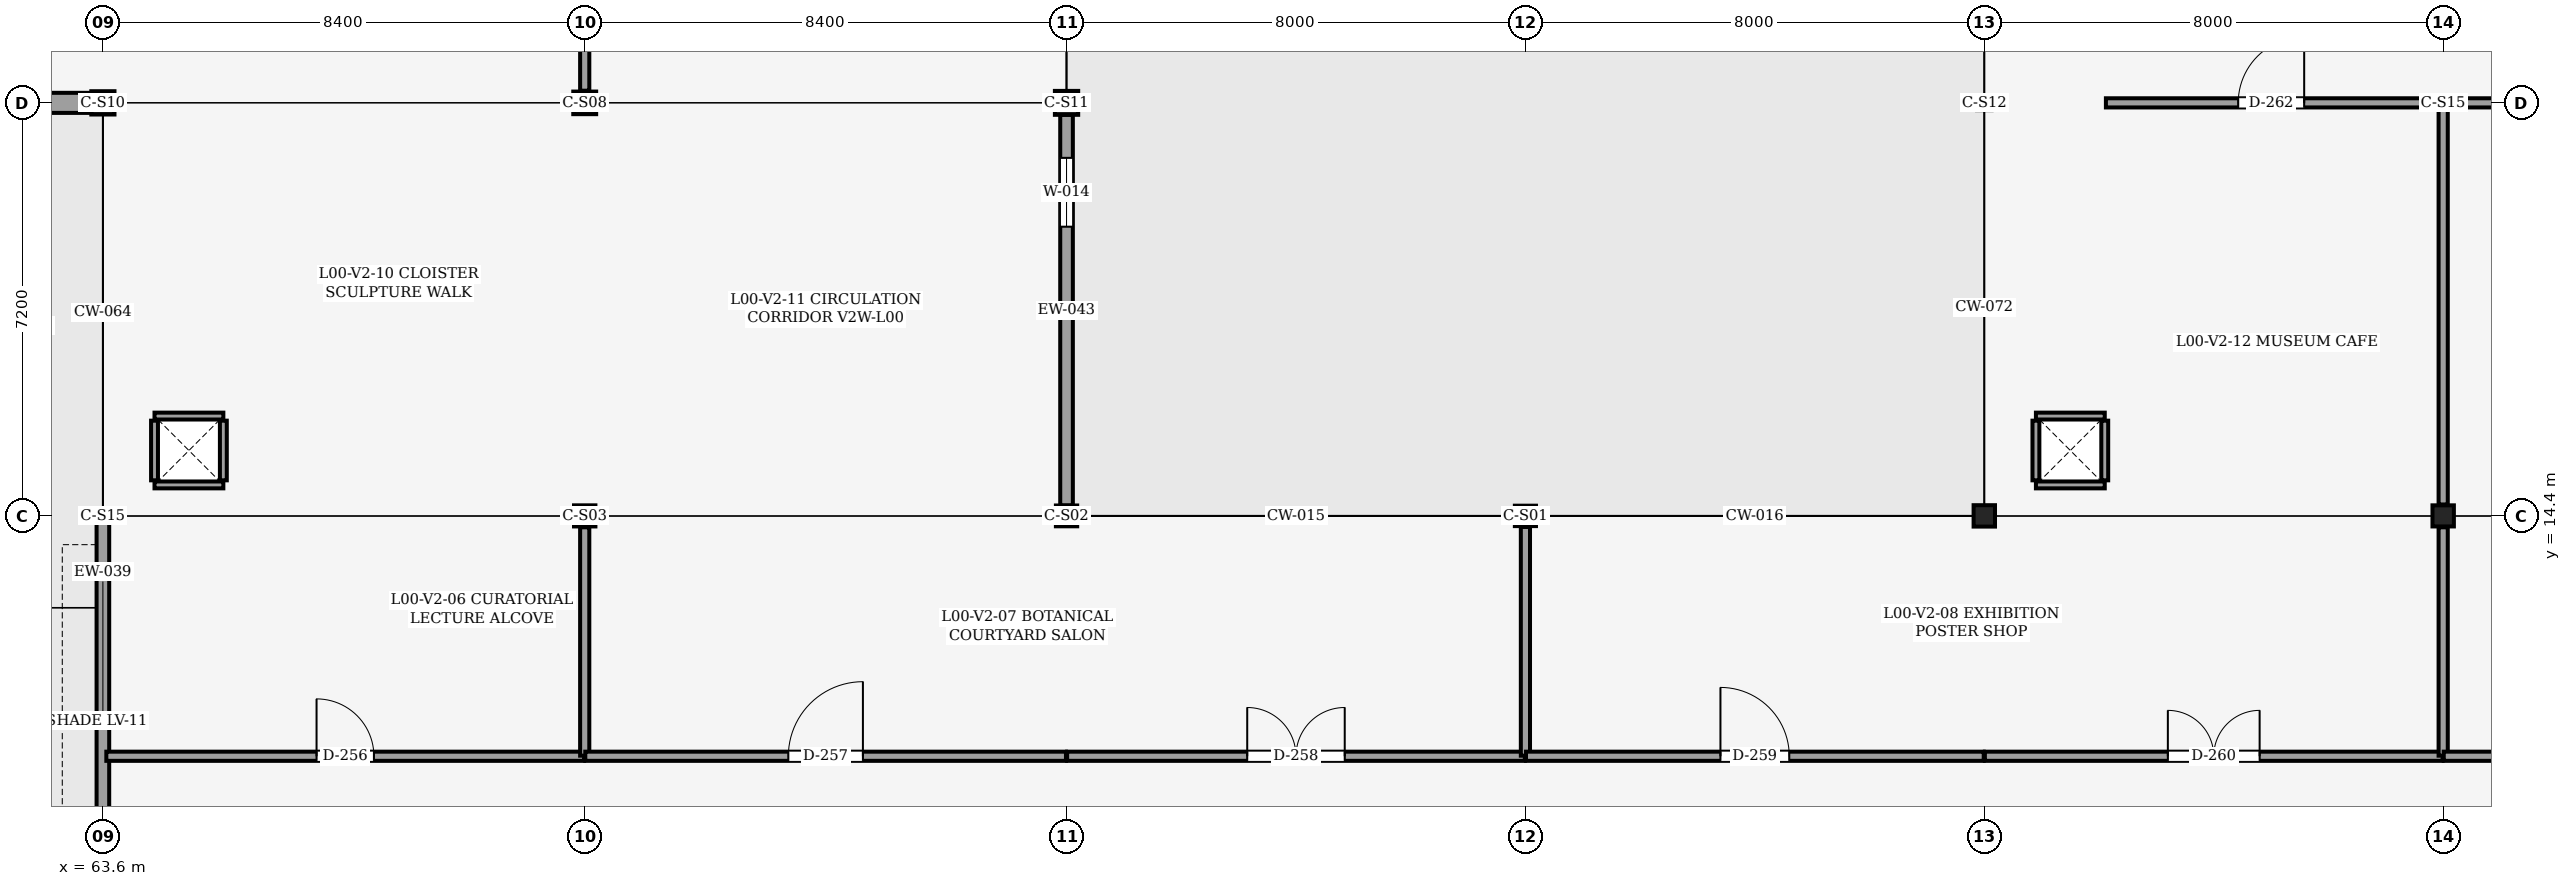
"""IFC4 building model, lengths in metres.
Left out: names, types, materials, properties, quantities, classifications, styles, units other than length and angle.
Written with IfcOpenShell. Run it as: python <this file> out.ifc"""

import sys

from ifc_helpers import new_model, si_unit, direction, frame, frame_2d, origin, origin_2d, place, context, subcontext, project, spatial, rectangle, hollow_rectangle, i_section, extrude, element, fill, save


model = new_model("IFC4")
c1 = context("Model", 3, precision=1e-05, world=origin(), true_north=direction((0.0, 1.0)))
c2 = subcontext(c1, "Body", "Model", "MODEL_VIEW")
j1 = project(units=[si_unit("LENGTHUNIT", "METRE"), si_unit("PLANEANGLEUNIT", "RADIAN")], contexts=[c1])
p1 = place(None, origin())
s1 = spatial("IfcSite", under=j1, at=p1, CompositionType="ELEMENT")
p2 = place(p1, origin())
s2 = spatial("IfcBuilding", under=s1, at=p2, CompositionType="ELEMENT")
p3 = place(p2, origin())
s3 = spatial("IfcBuildingStorey", under=s2, at=p3, CompositionType="ELEMENT", Elevation=0.0)
p4 = place(p3, frame((63.6, 14.4, 0.0), z_axis=(0.0, 0.0, 1.0), x_axis=(1.0, 0.0, 0.0)))
e1 = element("IfcColumn", 1, at=p4, inside=s3, PredefinedType="COLUMN", context=c2, shape_type="SweptSolid", body=[
    extrude(hollow_rectangle(XDim=0.203, YDim=0.203, WallThickness=0.013, OuterFilletRadius=0.025, at=origin_2d()), origin(), (0.0, 0.0, 1.0), 5.4),
])
p5 = place(p3, frame((63.6, 21.6, 0.0), z_axis=(0.0, 0.0, 1.0), x_axis=(1.0, 0.0, 0.0)))
e2 = element("IfcColumn", 2, at=p5, inside=s3, PredefinedType="COLUMN", context=c2, shape_type="SweptSolid", body=[
    extrude(i_section(OverallWidth=0.404, OverallDepth=0.406, WebThickness=0.027, FlangeThickness=0.044, FilletRadius=0.025, at=origin_2d()), origin(), (0.0, 0.0, 1.0), 5.4),
])
p6 = place(p3, frame((72.0, 14.4, 0.0), z_axis=(0.0, 0.0, 1.0), x_axis=(1.0, 0.0, 0.0)))
e3 = element("IfcColumn", 3, at=p6, inside=s3, PredefinedType="COLUMN", context=c2, shape_type="SweptSolid", body=[
    extrude(i_section(OverallWidth=0.373, OverallDepth=0.368, WebThickness=0.015, FlangeThickness=0.024, FilletRadius=0.025, at=origin_2d()), origin(), (0.0, 0.0, 1.0), 5.4),
])
p7 = place(p3, frame((72.0, 21.6, 0.0), z_axis=(0.0, 0.0, 1.0), x_axis=(1.0, 0.0, 0.0)))
e4 = element("IfcColumn", 4, at=p7, inside=s3, PredefinedType="COLUMN", context=c2, shape_type="SweptSolid", body=[
    extrude(i_section(OverallWidth=0.399, OverallDepth=0.394, WebThickness=0.023, FlangeThickness=0.037, FilletRadius=0.025, at=origin_2d()), origin(), (0.0, 0.0, 1.0), 5.4),
])
p8 = place(p3, frame((80.4, 14.4, 0.0), z_axis=(0.0, 0.0, 1.0), x_axis=(1.0, 0.0, 0.0)))
e5 = element("IfcColumn", 5, at=p8, inside=s3, PredefinedType="COLUMN", context=c2, shape_type="SweptSolid", body=[
    extrude(i_section(OverallWidth=0.371, OverallDepth=0.363, WebThickness=0.013, FlangeThickness=0.022, FilletRadius=0.025, at=origin_2d()), origin(), (0.0, 0.0, 1.0), 5.4),
])
p9 = place(p3, frame((80.4, 21.6, 0.0), z_axis=(0.0, 0.0, 1.0), x_axis=(1.0, 0.0, 0.0)))
e6 = element("IfcColumn", 6, at=p9, inside=s3, PredefinedType="COLUMN", context=c2, shape_type="SweptSolid", body=[
    extrude(i_section(OverallWidth=0.406, OverallDepth=0.417, WebThickness=0.03, FlangeThickness=0.048, FilletRadius=0.025, at=origin_2d()), origin(), (0.0, 0.0, 1.0), 5.4),
])
p10 = place(p3, frame((88.4, 14.4, 0.0), z_axis=(0.0, 0.0, 1.0), x_axis=(1.0, 0.0, 0.0)))
e7 = element("IfcColumn", 7, at=p10, inside=s3, PredefinedType="COLUMN", context=c2, shape_type="SweptSolid", body=[
    extrude(i_section(OverallWidth=0.368, OverallDepth=0.356, WebThickness=0.011, FlangeThickness=0.018, FilletRadius=0.025, at=origin_2d()), origin(), (0.0, 0.0, 1.0), 5.4),
])
p11 = place(p3, frame((96.4, 14.4, 0.0), z_axis=(0.0, 0.0, 1.0), x_axis=(1.0, 0.0, 0.0)))
e8 = element("IfcColumn", 8, at=p11, inside=s3, PredefinedType="COLUMN", context=c2, shape_type="SweptSolid", body=[
    extrude(i_section(OverallWidth=0.373, OverallDepth=0.373, WebThickness=0.016, FlangeThickness=0.026, FilletRadius=0.025, at=origin_2d()), origin(), (0.0, 0.0, 1.0), 5.4),
])
p12 = place(p3, frame((96.4, 21.6, 0.0), z_axis=(0.0, 0.0, 1.0), x_axis=(1.0, 0.0, 0.0)))
e9 = element("IfcColumn", 9, at=p12, inside=s3, PredefinedType="COLUMN", context=c2, shape_type="SweptSolid", body=[
    extrude(hollow_rectangle(XDim=0.254, YDim=0.254, WallThickness=0.013, OuterFilletRadius=0.025, at=origin_2d()), origin(), (0.0, 0.0, 1.0), 5.4),
])
p13 = place(p3, frame((104.4, 14.4, 0.0), z_axis=(0.0, 0.0, 1.0), x_axis=(1.0, 0.0, 0.0)))
e10 = element("IfcColumn", 10, at=p13, inside=s3, PredefinedType="COLUMN", context=c2, shape_type="SweptSolid", body=[
    extrude(i_section(OverallWidth=0.373, OverallDepth=0.368, WebThickness=0.015, FlangeThickness=0.024, FilletRadius=0.025, at=origin_2d()), origin(), (0.0, 0.0, 1.0), 5.4),
])
p14 = place(p3, frame((104.4, 21.6, 0.0), z_axis=(0.0, 0.0, 1.0), x_axis=(1.0, 0.0, 0.0)))
e11 = element("IfcColumn", 11, at=p14, inside=s3, PredefinedType="COLUMN", context=c2, shape_type="SweptSolid", body=[
    extrude(hollow_rectangle(XDim=0.203, YDim=0.203, WallThickness=0.013, OuterFilletRadius=0.025, at=origin_2d()), origin(), (0.0, 0.0, 1.0), 5.4),
])
p15 = place(p3, frame((63.398, 21.6, 0.0), z_axis=(0.0, 0.0, 1.0), x_axis=(-1.0, 0.0, 0.0)))
e12 = element("IfcWall", 12, at=p15, inside=s3, PredefinedType="SOLIDWALL", context=c2, shape_type="SweptSolid", body=[
    extrude(rectangle(XDim=7.999, YDim=0.35, at=frame_2d((3.999, 0.0))), origin(), (0.0, 0.0, 1.0), 4.883),
])
p16 = place(p15, frame((3.199, 0.0, 0.0)))
e13 = element("IfcOpeningElement", 13, at=p16, cuts=e12, PredefinedType="OPENING", context=c2, shape_type="SweptSolid", body=[
    extrude(rectangle(XDim=1.6, YDim=2.25, at=frame_2d((0.8, 1.125))), frame((0.0, 0.185, 0.0), z_axis=(0.0, -1.0, 0.0), x_axis=(1.0, 0.0, 0.0)), (0.0, 0.0, 1.0), 0.371),
])
p17 = place(p3, frame((63.6, 7.352, 0.0), z_axis=(0.0, 0.0, 1.0), x_axis=(0.0, 1.0, 0.0)))
e14 = element("IfcWall", 14, at=p17, inside=s3, PredefinedType="SOLIDWALL", context=c2, shape_type="SweptSolid", body=[
    extrude(rectangle(XDim=6.946, YDim=0.22, at=frame_2d((3.473, 0.0))), origin(), (0.0, 0.0, 1.0), 4.678),
])
p18 = place(p17, frame((0.75, 0.0, 0.9)))
e15 = element("IfcOpeningElement", 15, at=p18, cuts=e14, PredefinedType="OPENING", context=c2, shape_type="SweptSolid", body=[
    extrude(rectangle(XDim=1.2, YDim=1.5, at=frame_2d((0.6, 0.75))), frame((0.0, 0.12, 0.0), z_axis=(0.0, -1.0, 0.0), x_axis=(1.0, 0.0, 0.0)), (0.0, 0.0, 1.0), 0.24),
])
p19 = place(p3, frame((80.4, 21.392, 0.0), z_axis=(0.0, 0.0, 1.0), x_axis=(0.0, -1.0, 0.0)))
e16 = element("IfcWall", 16, at=p19, inside=s3, PredefinedType="SOLIDWALL", context=c2, shape_type="SweptSolid", body=[
    extrude(rectangle(XDim=6.81, YDim=0.22, at=frame_2d((3.405, 0.0))), origin(), (0.0, 0.0, 1.0), 4.607),
])
p20 = place(p19, frame((0.75, 0.0, 0.9)))
e17 = element("IfcOpeningElement", 17, at=p20, cuts=e16, PredefinedType="OPENING", context=c2, shape_type="SweptSolid", body=[
    extrude(rectangle(XDim=1.2, YDim=1.5, at=frame_2d((0.6, 0.75))), frame((0.0, 0.12, 0.0), z_axis=(0.0, -1.0, 0.0), x_axis=(1.0, 0.0, 0.0)), (0.0, 0.0, 1.0), 0.24),
])
for number, where, z_axis, x_axis in (
    (18, (64.5, 14.94, 0.0), (0.0, 0.0, 1.0), (1.0, 0.0, 0.0)),
    (19, (64.5, 16.14, 0.0), (0.0, 0.0, 1.0), (1.0, 0.0, 0.0)),
):
    element("IfcWall", number, at=place(p3, frame(where, z_axis=z_axis, x_axis=x_axis)), inside=s3, PredefinedType="PARTITIONING", context=c2, shape_type="SweptSolid", body=[
        extrude(rectangle(XDim=1.2, YDim=0.12, at=frame_2d((0.6, 0.0))), origin(), (0.0, 0.0, 1.0), 5.16),
    ])
for number, where, z_axis, x_axis in (
    (20, (64.5, 15.02, 0.0), (0.0, 0.0, 1.0), (0.0, 1.0, 0.0)),
    (21, (65.7, 15.02, 0.0), (0.0, 0.0, 1.0), (0.0, 1.0, 0.0)),
):
    element("IfcWall", number, at=place(p3, frame(where, z_axis=z_axis, x_axis=x_axis)), inside=s3, PredefinedType="PARTITIONING", context=c2, shape_type="SweptSolid", body=[
        extrude(rectangle(XDim=1.04, YDim=0.12, at=frame_2d((0.52, 0.0))), origin(), (0.0, 0.0, 1.0), 5.16),
    ])
for number, where, z_axis, x_axis in (
    (22, (97.3, 14.94, 0.0), (0.0, 0.0, 1.0), (1.0, 0.0, 0.0)),
    (23, (97.3, 16.14, 0.0), (0.0, 0.0, 1.0), (1.0, 0.0, 0.0)),
):
    element("IfcWall", number, at=place(p3, frame(where, z_axis=z_axis, x_axis=x_axis)), inside=s3, PredefinedType="PARTITIONING", context=c2, shape_type="SweptSolid", body=[
        extrude(rectangle(XDim=1.2, YDim=0.12, at=frame_2d((0.6, 0.0))), origin(), (0.0, 0.0, 1.0), 5.16),
    ])
for number, where, z_axis, x_axis in (
    (24, (97.3, 15.02, 0.0), (0.0, 0.0, 1.0), (0.0, 1.0, 0.0)),
    (25, (98.5, 15.02, 0.0), (0.0, 0.0, 1.0), (0.0, 1.0, 0.0)),
):
    element("IfcWall", number, at=place(p3, frame(where, z_axis=z_axis, x_axis=x_axis)), inside=s3, PredefinedType="PARTITIONING", context=c2, shape_type="SweptSolid", body=[
        extrude(rectangle(XDim=1.04, YDim=0.12, at=frame_2d((0.52, 0.0))), origin(), (0.0, 0.0, 1.0), 5.16),
    ])
p21 = place(p3, frame((72.0, 21.812, 0.0), z_axis=(0.0, 0.0, 1.0), x_axis=(0.0, 1.0, 0.0)))
e26 = element("IfcWall", 26, at=p21, inside=s3, PredefinedType="PARTITIONING", context=c2, shape_type="SweptSolid", body=[
    extrude(rectangle(XDim=7.987, YDim=0.16, at=frame_2d((3.993, 0.0))), origin(), (0.0, 0.0, 1.0), 4.213),
])
p22 = place(p3, frame((63.66, 10.21, 0.0), z_axis=(0.0, 0.0, 1.0), x_axis=(1.0, 0.0, 0.0)))
e27 = element("IfcWall", 27, at=p22, inside=s3, PredefinedType="PARTITIONING", context=c2, shape_type="SweptSolid", body=[
    extrude(rectangle(XDim=8.33, YDim=0.16, at=frame_2d((4.165, 0.0))), origin(), (0.0, 0.0, 1.0), 5.14),
])
p23 = place(p22, frame((3.665, 0.0, 0.0)))
e28 = element("IfcOpeningElement", 28, at=p23, cuts=e27, PredefinedType="OPENING", context=c2, shape_type="SweptSolid", body=[
    extrude(rectangle(XDim=1.0, YDim=2.15, at=frame_2d((0.5, 1.075))), frame((0.0, 0.09, 0.0), z_axis=(0.0, -1.0, 0.0), x_axis=(1.0, 0.0, 0.0)), (0.0, 0.0, 1.0), 0.18),
])
p24 = place(p3, frame((72.0, 10.22, 0.0), z_axis=(0.0, 0.0, 1.0), x_axis=(0.0, 1.0, 0.0)))
e29 = element("IfcWall", 29, at=p24, inside=s3, PredefinedType="PARTITIONING", context=c2, shape_type="SweptSolid", body=[
    extrude(rectangle(XDim=3.981, YDim=0.16, at=frame_2d((1.99, 0.0))), origin(), (0.0, 0.0, 1.0), 4.528),
])
p25 = place(p3, frame((72.01, 10.21, 0.0), z_axis=(0.0, 0.0, 1.0), x_axis=(1.0, 0.0, 0.0)))
e30 = element("IfcWall", 30, at=p25, inside=s3, PredefinedType="PARTITIONING", context=c2, shape_type="SweptSolid", body=[
    extrude(rectangle(XDim=8.38, YDim=0.16, at=frame_2d((4.19, 0.0))), origin(), (0.0, 0.0, 1.0), 5.14),
])
p26 = place(p25, frame((3.54, 0.0, 0.0)))
e31 = element("IfcOpeningElement", 31, at=p26, cuts=e30, PredefinedType="OPENING", context=c2, shape_type="SweptSolid", body=[
    extrude(rectangle(XDim=1.3, YDim=2.2, at=frame_2d((0.65, 1.1))), frame((0.0, 0.09, 0.0), z_axis=(0.0, -1.0, 0.0), x_axis=(1.0, 0.0, 0.0)), (0.0, 0.0, 1.0), 0.18),
])
p27 = place(p3, frame((80.41, 10.21, 0.0), z_axis=(0.0, 0.0, 1.0), x_axis=(1.0, 0.0, 0.0)))
e32 = element("IfcWall", 32, at=p27, inside=s3, PredefinedType="PARTITIONING", context=c2, shape_type="SweptSolid", body=[
    extrude(rectangle(XDim=7.98, YDim=0.16, at=frame_2d((3.99, 0.0))), origin(), (0.0, 0.0, 1.0), 5.14),
])
p28 = place(p27, frame((3.14, 0.0, 0.0)))
e33 = element("IfcOpeningElement", 33, at=p28, cuts=e32, PredefinedType="OPENING", context=c2, shape_type="SweptSolid", body=[
    extrude(rectangle(XDim=1.7, YDim=2.4, at=frame_2d((0.85, 1.2))), frame((0.0, 0.09, 0.0), z_axis=(0.0, -1.0, 0.0), x_axis=(1.0, 0.0, 0.0)), (0.0, 0.0, 1.0), 0.18),
])
p29 = place(p3, frame((88.4, 10.22, 0.0), z_axis=(0.0, 0.0, 1.0), x_axis=(0.0, 1.0, 0.0)))
e34 = element("IfcWall", 34, at=p29, inside=s3, PredefinedType="PARTITIONING", context=c2, shape_type="SweptSolid", body=[
    extrude(rectangle(XDim=3.987, YDim=0.16, at=frame_2d((1.994, 0.0))), origin(), (0.0, 0.0, 1.0), 4.607),
])
p30 = place(p3, frame((88.41, 10.21, 0.0), z_axis=(0.0, 0.0, 1.0), x_axis=(1.0, 0.0, 0.0)))
e35 = element("IfcWall", 35, at=p30, inside=s3, PredefinedType="PARTITIONING", context=c2, shape_type="SweptSolid", body=[
    extrude(rectangle(XDim=7.98, YDim=0.16, at=frame_2d((3.99, 0.0))), origin(), (0.0, 0.0, 1.0), 5.14),
])
p31 = place(p30, frame((3.39, 0.0, 0.0)))
e36 = element("IfcOpeningElement", 36, at=p31, cuts=e35, PredefinedType="OPENING", context=c2, shape_type="SweptSolid", body=[
    extrude(rectangle(XDim=1.2, YDim=2.2, at=frame_2d((0.6, 1.1))), frame((0.0, 0.09, 0.0), z_axis=(0.0, -1.0, 0.0), x_axis=(1.0, 0.0, 0.0)), (0.0, 0.0, 1.0), 0.18),
])
p32 = place(p3, frame((96.41, 10.21, 0.0), z_axis=(0.0, 0.0, 1.0), x_axis=(1.0, 0.0, 0.0)))
e37 = element("IfcWall", 37, at=p32, inside=s3, PredefinedType="PARTITIONING", context=c2, shape_type="SweptSolid", body=[
    extrude(rectangle(XDim=7.98, YDim=0.16, at=frame_2d((3.99, 0.0))), origin(), (0.0, 0.0, 1.0), 5.14),
])
p33 = place(p32, frame((3.19, 0.0, 0.0)))
e38 = element("IfcOpeningElement", 38, at=p33, cuts=e37, PredefinedType="OPENING", context=c2, shape_type="SweptSolid", body=[
    extrude(rectangle(XDim=1.6, YDim=2.35, at=frame_2d((0.8, 1.175))), frame((0.0, 0.09, 0.0), z_axis=(0.0, -1.0, 0.0), x_axis=(1.0, 0.0, 0.0)), (0.0, 0.0, 1.0), 0.18),
])
p34 = place(p3, frame((104.4, 10.22, 0.0), z_axis=(0.0, 0.0, 1.0), x_axis=(0.0, 1.0, 0.0)))
e39 = element("IfcWall", 39, at=p34, inside=s3, PredefinedType="PARTITIONING", context=c2, shape_type="SweptSolid", body=[
    extrude(rectangle(XDim=3.981, YDim=0.16, at=frame_2d((1.99, 0.0))), origin(), (0.0, 0.0, 1.0), 4.528),
])
p35 = place(p3, frame((104.41, 10.21, 0.0), z_axis=(0.0, 0.0, 1.0), x_axis=(1.0, 0.0, 0.0)))
e40 = element("IfcWall", 40, at=p35, inside=s3, PredefinedType="PARTITIONING", context=c2, shape_type="SweptSolid", body=[
    extrude(rectangle(XDim=8.33, YDim=0.16, at=frame_2d((4.165, 0.0))), origin(), (0.0, 0.0, 1.0), 5.14),
])
p36 = place(p35, frame((3.215, 0.0, 0.0)))
e41 = element("IfcOpeningElement", 41, at=p36, cuts=e40, PredefinedType="OPENING", context=c2, shape_type="SweptSolid", body=[
    extrude(rectangle(XDim=1.9, YDim=2.45, at=frame_2d((0.95, 1.225))), frame((0.0, 0.09, 0.0), z_axis=(0.0, -1.0, 0.0), x_axis=(1.0, 0.0, 0.0)), (0.0, 0.0, 1.0), 0.18),
])
p37 = place(p3, frame((98.52, 21.6, 0.0), z_axis=(0.0, 0.0, 1.0), x_axis=(1.0, 0.0, 0.0)))
e42 = element("IfcWall", 42, at=p37, inside=s3, PredefinedType="PARTITIONING", context=c2, shape_type="SweptSolid", body=[
    extrude(rectangle(XDim=5.763, YDim=0.16, at=frame_2d((2.882, 0.0))), origin(), (0.0, 0.0, 1.0), 4.591),
])
p38 = place(p37, frame((2.307, 0.0, 0.0)))
e43 = element("IfcOpeningElement", 43, at=p38, cuts=e42, PredefinedType="OPENING", context=c2, shape_type="SweptSolid", body=[
    extrude(rectangle(XDim=1.15, YDim=2.2, at=frame_2d((0.575, 1.1))), frame((0.0, 0.09, 0.0), z_axis=(0.0, -1.0, 0.0), x_axis=(1.0, 0.0, 0.0)), (0.0, 0.0, 1.0), 0.18),
])
p39 = place(p3, frame((104.4, 14.599, 0.0), z_axis=(0.0, 0.0, 1.0), x_axis=(0.0, 1.0, 0.0)))
e44 = element("IfcWall", 44, at=p39, inside=s3, PredefinedType="PARTITIONING", context=c2, shape_type="SweptSolid", body=[
    extrude(rectangle(XDim=6.884, YDim=0.16, at=frame_2d((3.442, 0.0))), origin(), (0.0, 0.0, 1.0), 4.533),
])
p40 = place(p3, frame((104.517, 21.6, 0.0), z_axis=(0.0, 0.0, 1.0), x_axis=(1.0, 0.0, 0.0)))
e45 = element("IfcWall", 45, at=p40, inside=s3, PredefinedType="PARTITIONING", context=c2, shape_type="SweptSolid", body=[
    extrude(rectangle(XDim=8.069, YDim=0.16, at=frame_2d((4.034, 0.0))), origin(), (0.0, 0.0, 1.0), 4.528),
])
p41 = place(p40, frame((3.234, 0.0, 0.0)))
e46 = element("IfcOpeningElement", 46, at=p41, cuts=e45, PredefinedType="OPENING", context=c2, shape_type="SweptSolid", body=[
    extrude(rectangle(XDim=1.6, YDim=2.35, at=frame_2d((0.8, 1.175))), frame((0.0, 0.09, 0.0), z_axis=(0.0, -1.0, 0.0), x_axis=(1.0, 0.0, 0.0)), (0.0, 0.0, 1.0), 0.18),
])
p42 = place(p20, origin())
e47 = element("IfcWindow", 47, at=p42, inside=s3, PartitioningType="SINGLE_PANEL", PredefinedType="WINDOW", context=c2, shape_type="SweptSolid", body=[
    extrude(rectangle(XDim=1.2, YDim=1.5, at=frame_2d((0.6, 0.75))), frame((0.0, 0.03, 0.0), z_axis=(0.0, -1.0, 0.0), x_axis=(1.0, 0.0, 0.0)), (0.0, 0.0, 1.0), 0.06),
])
fill(e17, e47)
p43 = place(p23, origin())
e48 = element("IfcDoor", 48, at=p43, inside=s3, OperationType="SINGLE_SWING_LEFT", PredefinedType="DOOR", context=c2, shape_type="SweptSolid", body=[
    extrude(rectangle(XDim=1.0, YDim=2.15, at=frame_2d((0.5, 1.075))), frame((0.0, 0.025, 0.0), z_axis=(0.0, -1.0, 0.0), x_axis=(1.0, 0.0, 0.0)), (0.0, 0.0, 1.0), 0.05),
])
fill(e28, e48)
p44 = place(p26, origin())
e49 = element("IfcDoor", 49, at=p44, inside=s3, OperationType="SINGLE_SWING_RIGHT", PredefinedType="DOOR", context=c2, shape_type="SweptSolid", body=[
    extrude(rectangle(XDim=1.3, YDim=2.2, at=frame_2d((0.65, 1.1))), frame((0.0, 0.025, 0.0), z_axis=(0.0, -1.0, 0.0), x_axis=(1.0, 0.0, 0.0)), (0.0, 0.0, 1.0), 0.05),
])
fill(e31, e49)
p45 = place(p28, origin())
e50 = element("IfcDoor", 50, at=p45, inside=s3, OperationType="DOUBLE_DOOR_SINGLE_SWING", PredefinedType="DOOR", context=c2, shape_type="SweptSolid", body=[
    extrude(rectangle(XDim=1.7, YDim=2.4, at=frame_2d((0.85, 1.2))), frame((0.0, 0.025, 0.0), z_axis=(0.0, -1.0, 0.0), x_axis=(1.0, 0.0, 0.0)), (0.0, 0.0, 1.0), 0.05),
])
fill(e33, e50)
p46 = place(p31, origin())
e51 = element("IfcDoor", 51, at=p46, inside=s3, OperationType="SINGLE_SWING_LEFT", PredefinedType="DOOR", context=c2, shape_type="SweptSolid", body=[
    extrude(rectangle(XDim=1.2, YDim=2.2, at=frame_2d((0.6, 1.1))), frame((0.0, 0.025, 0.0), z_axis=(0.0, -1.0, 0.0), x_axis=(1.0, 0.0, 0.0)), (0.0, 0.0, 1.0), 0.05),
])
fill(e36, e51)
p47 = place(p33, origin())
e52 = element("IfcDoor", 52, at=p47, inside=s3, OperationType="DOUBLE_DOOR_SINGLE_SWING", PredefinedType="DOOR", context=c2, shape_type="SweptSolid", body=[
    extrude(rectangle(XDim=1.6, YDim=2.35, at=frame_2d((0.8, 1.175))), frame((0.0, 0.025, 0.0), z_axis=(0.0, -1.0, 0.0), x_axis=(1.0, 0.0, 0.0)), (0.0, 0.0, 1.0), 0.05),
])
fill(e38, e52)
p48 = place(p38, origin())
e53 = element("IfcDoor", 53, at=p48, inside=s3, OperationType="SINGLE_SWING_RIGHT", PredefinedType="DOOR", context=c2, shape_type="SweptSolid", body=[
    extrude(rectangle(XDim=1.15, YDim=2.2, at=frame_2d((0.575, 1.1))), frame((0.0, 0.025, 0.0), z_axis=(0.0, -1.0, 0.0), x_axis=(1.0, 0.0, 0.0)), (0.0, 0.0, 1.0), 0.05),
])
fill(e43, e53)
save(model, sys.argv[1])
